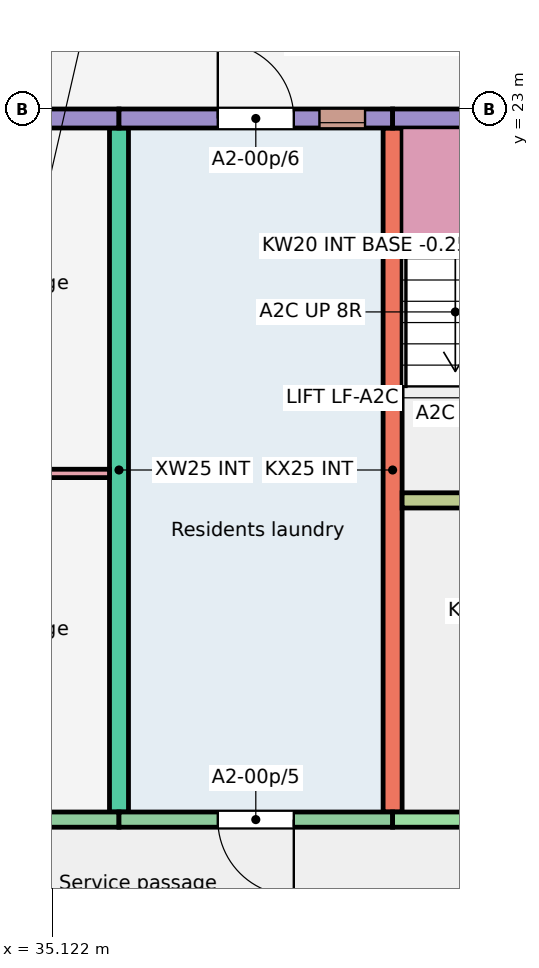
"""IFC4 building model, lengths in metres.
Left out: names, types, materials, properties, quantities, classifications, styles, units other than length and angle.
Written with IfcOpenShell. Run it as: python <this file> out.ifc"""

import sys

from ifc_helpers import new_model, si_unit, direction, frame, frame_2d, origin, place, context, subcontext, project, spatial, rectangle, extrude, element, fill, save


model = new_model("IFC4")
c1 = context("Model", 3, precision=1e-05, world=origin(), true_north=direction((0.0, 1.0)))
c2 = subcontext(c1, "Body", "Model", "MODEL_VIEW")
j1 = project(units=[si_unit("LENGTHUNIT", "METRE"), si_unit("PLANEANGLEUNIT", "RADIAN")], contexts=[c1])
p1 = place(None, origin())
s1 = spatial("IfcSite", under=j1, at=p1, CompositionType="ELEMENT")
p2 = place(p1, origin())
s2 = spatial("IfcBuilding", under=s1, at=p2, CompositionType="ELEMENT")
p3 = place(p2, origin())
s3 = spatial("IfcBuildingStorey", under=s2, at=p3, CompositionType="ELEMENT", Elevation=0.0)
for number, where, z_axis, x_axis in (
    (1, (36.0, 13.75, -0.25), (0.0, 0.0, 1.0), (0.0, 1.0, 0.0)),
    (2, (39.6, 13.75, -0.25), (0.0, 0.0, 1.0), (0.0, 1.0, 0.0)),
):
    element("IfcWall", number, at=place(p3, frame(where, z_axis=z_axis, x_axis=x_axis)), inside=s3, PredefinedType="SHEAR", context=c2, shape_type="SweptSolid", body=[
        extrude(rectangle(XDim=9.0, YDim=0.25, at=frame_2d((4.5, 0.0))), origin(), (0.0, 0.0, 1.0), 3.25),
    ])
p4 = place(p3, frame((32.4, 22.875, -0.25), z_axis=(0.0, 0.0, 1.0), x_axis=(1.0, 0.0, 0.0)))
e3 = element("IfcWall", 3, at=p4, inside=s3, PredefinedType="SOLIDWALL", context=c2, shape_type="SweptSolid", body=[
    extrude(rectangle(XDim=3.6, YDim=0.25, at=frame_2d((1.8, 0.0))), origin(), (0.0, 0.0, 1.0), 3.25),
])
p5 = place(p4, frame((1.3, 0.0, 0.25)))
e4 = element("IfcOpeningElement", 4, at=p5, cuts=e3, PredefinedType="OPENING", context=c2, shape_type="SweptSolid", body=[
    extrude(rectangle(XDim=1.0, YDim=2.1, at=frame_2d((0.5, 1.05))), frame((0.0, 0.135, 0.0), z_axis=(0.0, -1.0, 0.0), x_axis=(1.0, 0.0, 0.0)), (0.0, 0.0, 1.0), 0.27),
])
p6 = place(p3, frame((32.4, 13.65, -0.25), z_axis=(0.0, 0.0, 1.0), x_axis=(1.0, 0.0, 0.0)))
e5 = element("IfcWall", 5, at=p6, inside=s3, PredefinedType="SOLIDWALL", context=c2, shape_type="SweptSolid", body=[
    extrude(rectangle(XDim=3.6, YDim=0.2, at=frame_2d((1.8, 0.0))), origin(), (0.0, 0.0, 1.0), 3.25),
])
p7 = place(p6, frame((1.3, 0.0, 0.25)))
e6 = element("IfcOpeningElement", 6, at=p7, cuts=e5, PredefinedType="OPENING", context=c2, shape_type="SweptSolid", body=[
    extrude(rectangle(XDim=1.0, YDim=2.1, at=frame_2d((0.5, 1.05))), frame((0.0, 0.11, 0.0), z_axis=(0.0, -1.0, 0.0), x_axis=(1.0, 0.0, 0.0)), (0.0, 0.0, 1.0), 0.22),
])
p8 = place(p3, frame((36.0, 22.875, -0.25), z_axis=(0.0, 0.0, 1.0), x_axis=(1.0, 0.0, 0.0)))
e7 = element("IfcWall", 7, at=p8, inside=s3, PredefinedType="SOLIDWALL", context=c2, shape_type="SweptSolid", body=[
    extrude(rectangle(XDim=3.6, YDim=0.25, at=frame_2d((1.8, 0.0))), origin(), (0.0, 0.0, 1.0), 3.25),
])
p9 = place(p8, frame((2.637, 0.0, 2.05)))
e8 = element("IfcOpeningElement", 8, at=p9, cuts=e7, PredefinedType="OPENING", context=c2, shape_type="SweptSolid", body=[
    extrude(rectangle(XDim=0.6, YDim=0.6, at=frame_2d((0.3, 0.3))), frame((0.0, 0.135, 0.0), z_axis=(0.0, -1.0, 0.0), x_axis=(1.0, 0.0, 0.0)), (0.0, 0.0, 1.0), 0.27),
])
p10 = place(p8, frame((1.3, 0.0, 0.25)))
e9 = element("IfcOpeningElement", 9, at=p10, cuts=e7, PredefinedType="OPENING", context=c2, shape_type="SweptSolid", body=[
    extrude(rectangle(XDim=1.0, YDim=2.1, at=frame_2d((0.5, 1.05))), frame((0.0, 0.135, 0.0), z_axis=(0.0, -1.0, 0.0), x_axis=(1.0, 0.0, 0.0)), (0.0, 0.0, 1.0), 0.27),
])
p11 = place(p3, frame((36.0, 13.65, -0.25), z_axis=(0.0, 0.0, 1.0), x_axis=(1.0, 0.0, 0.0)))
e10 = element("IfcWall", 10, at=p11, inside=s3, PredefinedType="SOLIDWALL", context=c2, shape_type="SweptSolid", body=[
    extrude(rectangle(XDim=3.6, YDim=0.2, at=frame_2d((1.8, 0.0))), origin(), (0.0, 0.0, 1.0), 3.25),
])
p12 = place(p11, frame((1.3, 0.0, 0.25)))
e11 = element("IfcOpeningElement", 11, at=p12, cuts=e10, PredefinedType="OPENING", context=c2, shape_type="SweptSolid", body=[
    extrude(rectangle(XDim=1.0, YDim=2.1, at=frame_2d((0.5, 1.05))), frame((0.0, 0.11, 0.0), z_axis=(0.0, -1.0, 0.0), x_axis=(1.0, 0.0, 0.0)), (0.0, 0.0, 1.0), 0.22),
])
p13 = place(p3, frame((39.6, 22.875, -0.25), z_axis=(0.0, 0.0, 1.0), x_axis=(1.0, 0.0, 0.0)))
e12 = element("IfcWall", 12, at=p13, inside=s3, PredefinedType="SOLIDWALL", context=c2, shape_type="SweptSolid", body=[
    extrude(rectangle(XDim=6.0, YDim=0.25, at=frame_2d((3.0, 0.0))), origin(), (0.0, 0.0, 1.0), 3.25),
])
p14 = place(p13, frame((1.025, 0.0, 0.25)))
e13 = element("IfcOpeningElement", 13, at=p14, cuts=e12, PredefinedType="OPENING", context=c2, shape_type="SweptSolid", body=[
    extrude(rectangle(XDim=1.1, YDim=2.1, at=frame_2d((0.55, 1.05))), frame((0.0, 0.135, 0.0), z_axis=(0.0, -1.0, 0.0), x_axis=(1.0, 0.0, 0.0)), (0.0, 0.0, 1.0), 0.27),
])
p15 = place(p3, frame((39.6, 13.65, -0.25), z_axis=(0.0, 0.0, 1.0), x_axis=(1.0, 0.0, 0.0)))
e14 = element("IfcWall", 14, at=p15, inside=s3, PredefinedType="SHEAR", context=c2, shape_type="SweptSolid", body=[
    extrude(rectangle(XDim=5.85, YDim=0.2, at=frame_2d((2.925, 0.0))), origin(), (0.0, 0.0, 1.0), 3.25),
])
p16 = place(p15, frame((2.438, 0.0, 0.25)))
e15 = element("IfcOpeningElement", 15, at=p16, cuts=e14, PredefinedType="OPENING", context=c2, shape_type="SweptSolid", body=[
    extrude(rectangle(XDim=1.1, YDim=2.1, at=frame_2d((0.55, 1.05))), frame((0.0, 0.11, 0.0), z_axis=(0.0, -1.0, 0.0), x_axis=(1.0, 0.0, 0.0)), (0.0, 0.0, 1.0), 0.22),
])
p17 = place(p3, frame((39.725, 17.85, -0.25), z_axis=(0.0, 0.0, 1.0), x_axis=(1.0, 0.0, 0.0)))
e16 = element("IfcWall", 16, at=p17, inside=s3, PredefinedType="SHEAR", context=c2, shape_type="SweptSolid", body=[
    extrude(rectangle(XDim=5.725, YDim=0.2, at=frame_2d((2.862, 0.0))), origin(), (0.0, 0.0, 1.0), 3.25),
])
p18 = place(p17, frame((0.95, 0.0, 0.25)))
e17 = element("IfcOpeningElement", 17, at=p18, cuts=e16, PredefinedType="OPENING", context=c2, shape_type="SweptSolid", body=[
    extrude(rectangle(XDim=1.0, YDim=2.1, at=frame_2d((0.5, 1.05))), frame((0.0, 0.11, 0.0), z_axis=(0.0, -1.0, 0.0), x_axis=(1.0, 0.0, 0.0)), (0.0, 0.0, 1.0), 0.22),
])
p19 = place(p17, frame((3.863, 0.0, 0.25)))
e18 = element("IfcOpeningElement", 18, at=p19, cuts=e16, PredefinedType="OPENING", context=c2, shape_type="SweptSolid", body=[
    extrude(rectangle(XDim=1.1, YDim=2.1, at=frame_2d((0.55, 1.05))), frame((0.0, 0.11, 0.0), z_axis=(0.0, -1.0, 0.0), x_axis=(1.0, 0.0, 0.0)), (0.0, 0.0, 1.0), 0.22),
])
p20 = place(p3, frame((32.525, 18.205, 0.0), z_axis=(0.0, 0.0, 1.0), x_axis=(1.0, 0.0, 0.0)))
e19 = element("IfcWall", 19, at=p20, inside=s3, PredefinedType="PARTITIONING", context=c2, shape_type="SweptSolid", body=[
    extrude(rectangle(XDim=3.35, YDim=0.11, at=frame_2d((1.675, 0.0))), origin(), (0.0, 0.0, 1.0), 2.8),
])
p21 = place(p9, origin())
e20 = element("IfcWindow", 20, at=p21, inside=s3, PartitioningType="SINGLE_PANEL", PredefinedType="WINDOW", context=c2, shape_type="SweptSolid", body=[
    extrude(rectangle(XDim=0.6, YDim=0.6, at=frame_2d((0.3, 0.3))), frame((0.0, -0.025, 0.0), z_axis=(0.0, -1.0, 0.0), x_axis=(1.0, 0.0, 0.0)), (0.0, 0.0, 1.0), 0.06),
])
fill(e8, e20)
p22 = place(p12, origin())
e21 = element("IfcDoor", 21, at=p22, inside=s3, OperationType="SINGLE_SWING_RIGHT", PredefinedType="DOOR", context=c2, shape_type="SweptSolid", body=[
    extrude(rectangle(XDim=1.0, YDim=2.1, at=frame_2d((0.5, 1.05))), frame((0.0, 0.025, 0.0), z_axis=(0.0, -1.0, 0.0), x_axis=(1.0, 0.0, 0.0)), (0.0, 0.0, 1.0), 0.05),
])
fill(e11, e21)
p23 = place(p10, origin())
e22 = element("IfcDoor", 22, at=p23, inside=s3, OperationType="SINGLE_SWING_LEFT", PredefinedType="DOOR", context=c2, shape_type="SweptSolid", body=[
    extrude(rectangle(XDim=1.0, YDim=2.1, at=frame_2d((0.5, 1.05))), frame((0.0, 0.025, 0.0), z_axis=(0.0, -1.0, 0.0), x_axis=(1.0, 0.0, 0.0)), (0.0, 0.0, 1.0), 0.05),
])
fill(e9, e22)
save(model, sys.argv[1])
